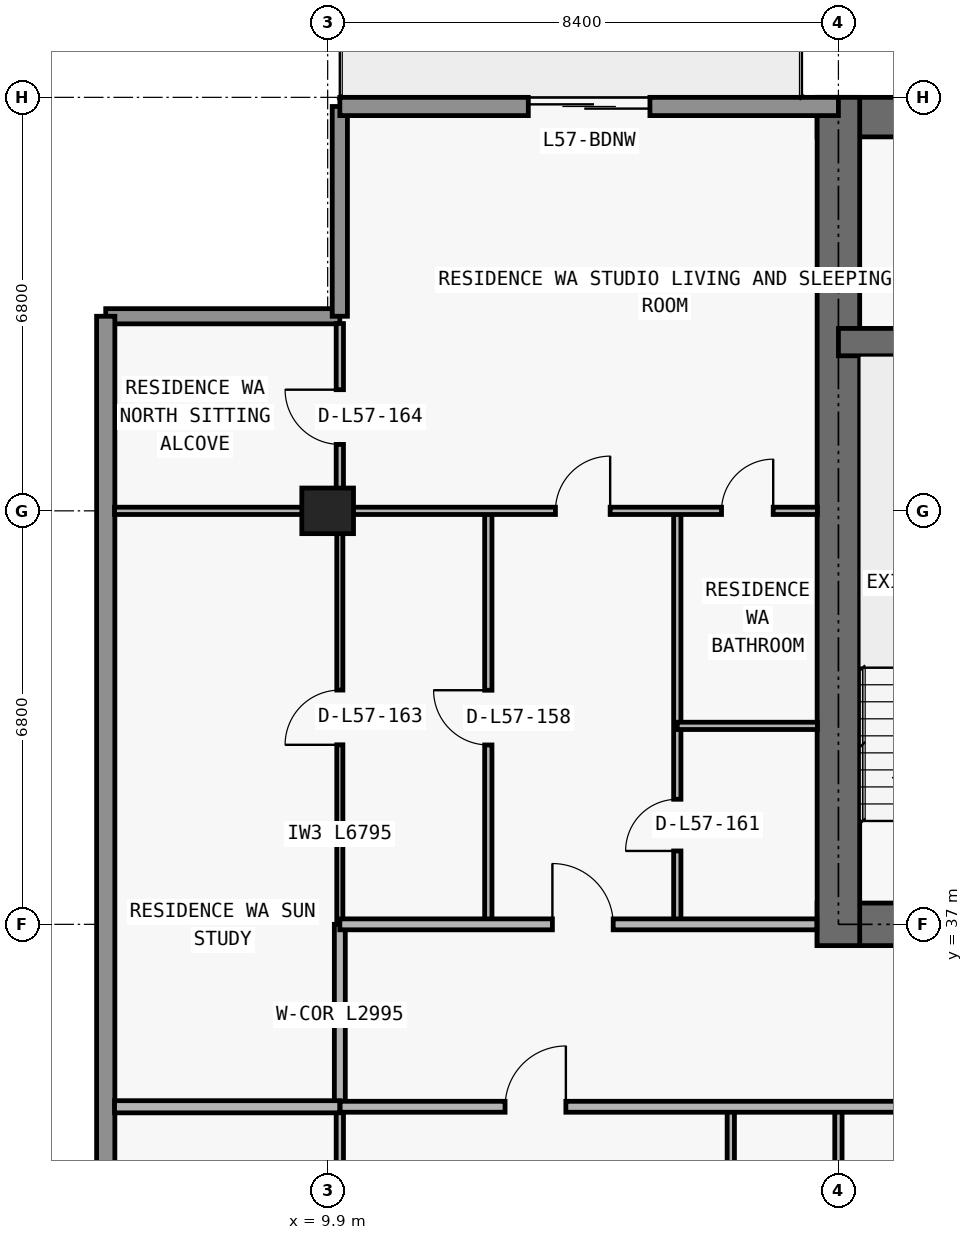
"""IFC4 building model, lengths in metres.
Left out: names, types, materials, properties, quantities, classifications, styles, units other than length and angle.
Written with IfcOpenShell. Run it as: python <this file> out.ifc"""

import sys

from ifc_helpers import new_model, si_unit, direction, frame, frame_2d, origin, origin_2d, place, context, subcontext, project, spatial, rectangle, extrude, element, fill, save


model = new_model("IFC4")
c1 = context("Model", 3, precision=1e-05, world=origin(), true_north=direction((0.0, 1.0)))
c2 = subcontext(c1, "Body", "Model", "MODEL_VIEW")
j1 = project(units=[si_unit("LENGTHUNIT", "METRE"), si_unit("PLANEANGLEUNIT", "RADIAN")], contexts=[c1])
p1 = place(None, origin())
s1 = spatial("IfcSite", under=j1, at=p1, CompositionType="ELEMENT")
p2 = place(p1, origin())
s2 = spatial("IfcBuilding", under=s1, at=p2, CompositionType="ELEMENT")
p3 = place(p2, frame((0.0, 0.0, 204.9)))
s3 = spatial("IfcBuildingStorey", under=s2, at=p3, CompositionType="ELEMENT", Elevation=204.9)
p4 = place(p3, frame((9.9, 43.8, 0.0), z_axis=(0.0, 0.0, 1.0), x_axis=(1.0, 0.0, 0.0)))
e1 = element("IfcColumn", 1, at=p4, inside=s3, PredefinedType="COLUMN", context=c2, shape_type="SweptSolid", body=[
    extrude(rectangle(XDim=0.85, YDim=0.75, at=origin_2d()), origin(), (0.0, 0.0, 1.0), 3.05),
])
p5 = place(p3, frame((17.95, 37.0, 0.0), z_axis=(0.0, 0.0, 1.0), x_axis=(1.0, 0.0, 0.0)))
e2 = element("IfcWall", 2, at=p5, inside=s3, PredefinedType="SHEAR", context=c2, shape_type="SweptSolid", body=[
    extrude(rectangle(XDim=41.9, YDim=0.7, at=frame_2d((20.95, 0.0))), origin(), (0.0, 0.0, 1.0), 3.05),
])
p6 = place(p5, frame((14.35, 0.0, 0.0)))
e3 = element("IfcOpeningElement", 3, at=p6, cuts=e2, PredefinedType="OPENING", context=c2, shape_type="SweptSolid", body=[
    extrude(rectangle(XDim=1.1, YDim=2.15, at=frame_2d((0.55, 1.075))), frame((0.0, 0.36, 0.0), z_axis=(0.0, -1.0, 0.0), x_axis=(1.0, 0.0, 0.0)), (0.0, 0.0, 1.0), 0.72),
])
p7 = place(p5, frame((6.2, 0.0, 0.0)))
e4 = element("IfcOpeningElement", 4, at=p7, cuts=e2, PredefinedType="OPENING", context=c2, shape_type="SweptSolid", body=[
    extrude(rectangle(XDim=1.05, YDim=2.15, at=frame_2d((0.525, 1.075))), frame((0.0, 0.36, 0.0), z_axis=(0.0, -1.0, 0.0), x_axis=(1.0, 0.0, 0.0)), (0.0, 0.0, 1.0), 0.72),
])
p8 = place(p5, frame((34.7, 0.0, 0.0)))
e5 = element("IfcOpeningElement", 5, at=p8, cuts=e2, PredefinedType="OPENING", context=c2, shape_type="SweptSolid", body=[
    extrude(rectangle(XDim=1.05, YDim=2.15, at=frame_2d((0.525, 1.075))), frame((0.0, 0.36, 0.0), z_axis=(0.0, -1.0, 0.0), x_axis=(1.0, 0.0, 0.0)), (0.0, 0.0, 1.0), 0.72),
])
p9 = place(p5, frame((10.812, 0.0, 0.0)))
e6 = element("IfcOpeningElement", 6, at=p9, cuts=e2, PredefinedType="OPENING", context=c2, shape_type="SweptSolid", body=[
    extrude(rectangle(XDim=1.05, YDim=2.15, at=frame_2d((0.525, 1.075))), frame((0.0, 0.36, 0.0), z_axis=(0.0, -1.0, 0.0), x_axis=(1.0, 0.0, 0.0)), (0.0, 0.0, 1.0), 0.72),
])
p10 = place(p5, frame((24.05, 0.0, 0.0)))
e7 = element("IfcOpeningElement", 7, at=p10, cuts=e2, PredefinedType="OPENING", context=c2, shape_type="SweptSolid", body=[
    extrude(rectangle(XDim=1.05, YDim=2.15, at=frame_2d((0.525, 1.075))), frame((0.0, 0.36, 0.0), z_axis=(0.0, -1.0, 0.0), x_axis=(1.0, 0.0, 0.0)), (0.0, 0.0, 1.0), 0.72),
])
p11 = place(p3, frame((17.95, 50.275, 0.0), z_axis=(0.0, 0.0, 1.0), x_axis=(1.0, 0.0, 0.0)))
e8 = element("IfcWall", 8, at=p11, inside=s3, PredefinedType="SHEAR", context=c2, shape_type="SweptSolid", body=[
    extrude(rectangle(XDim=41.9, YDim=0.65, at=frame_2d((20.95, 0.0))), origin(), (0.0, 0.0, 1.0), 3.05),
])
p12 = place(p3, frame((18.3, 36.65, 0.0), z_axis=(0.0, 0.0, 1.0), x_axis=(0.0, 1.0, 0.0)))
e9 = element("IfcWall", 9, at=p12, inside=s3, PredefinedType="SHEAR", context=c2, shape_type="SweptSolid", body=[
    extrude(rectangle(XDim=13.95, YDim=0.7, at=frame_2d((6.975, 0.0))), origin(), (0.0, 0.0, 1.0), 3.05),
])
p13 = place(p3, frame((18.3, 46.575, 0.0), z_axis=(0.0, 0.0, 1.0), x_axis=(1.0, 0.0, 0.0)))
e10 = element("IfcWall", 10, at=p13, inside=s3, PredefinedType="SHEAR", context=c2, shape_type="SweptSolid", body=[
    extrude(rectangle(XDim=41.2, YDim=0.45, at=frame_2d((20.6, 0.0))), origin(), (0.0, 0.0, 1.0), 3.05),
])
p14 = place(p13, frame((7.6, 0.0, 0.0)))
e11 = element("IfcOpeningElement", 11, at=p14, cuts=e10, PredefinedType="OPENING", context=c2, shape_type="SweptSolid", body=[
    extrude(rectangle(XDim=1.0, YDim=2.2, at=frame_2d((0.5, 1.1))), frame((0.0, 0.235, 0.0), z_axis=(0.0, -1.0, 0.0), x_axis=(1.0, 0.0, 0.0)), (0.0, 0.0, 1.0), 0.47),
])
p15 = place(p13, frame((32.625, 0.0, 0.0)))
e12 = element("IfcOpeningElement", 12, at=p15, cuts=e10, PredefinedType="OPENING", context=c2, shape_type="SweptSolid", body=[
    extrude(rectangle(XDim=1.05, YDim=2.15, at=frame_2d((0.525, 1.075))), frame((0.0, 0.235, 0.0), z_axis=(0.0, -1.0, 0.0), x_axis=(1.0, 0.0, 0.0)), (0.0, 0.0, 1.0), 0.47),
])
p16 = place(p3, frame((6.25, 47.0, 0.0), z_axis=(0.0, 0.0, 1.0), x_axis=(1.0, 0.0, 0.0)))
e13 = element("IfcWall", 13, at=p16, inside=s3, PredefinedType="ELEMENTEDWALL", context=c2, shape_type="SweptSolid", body=[
    extrude(rectangle(XDim=3.85, YDim=0.25, at=frame_2d((1.925, 0.0))), origin(), (0.0, 0.0, 1.0), 3.05),
])
p17 = place(p3, frame((10.1, 47.0, 0.0), z_axis=(0.0, 0.0, 1.0), x_axis=(0.0, 1.0, 0.0)))
e14 = element("IfcWall", 14, at=p17, inside=s3, PredefinedType="ELEMENTEDWALL", context=c2, shape_type="SweptSolid", body=[
    extrude(rectangle(XDim=3.45, YDim=0.25, at=frame_2d((1.725, 0.0))), origin(), (0.0, 0.0, 1.0), 3.05),
])
p18 = place(p3, frame((6.25, 29.1, 0.0), z_axis=(0.0, 0.0, 1.0), x_axis=(0.0, 1.0, 0.0)))
e15 = element("IfcWall", 15, at=p18, inside=s3, PredefinedType="STANDARD", context=c2, shape_type="SweptSolid", body=[
    extrude(rectangle(XDim=17.9, YDim=0.3, at=frame_2d((8.95, 0.0))), origin(), (0.0, 0.0, 1.0), 3.05),
])
p19 = place(p3, frame((10.1, 50.45, 0.0), z_axis=(0.0, 0.0, 1.0), x_axis=(1.0, 0.0, 0.0)))
e16 = element("IfcWall", 16, at=p19, inside=s3, PredefinedType="STANDARD", context=c2, shape_type="SweptSolid", body=[
    extrude(rectangle(XDim=8.2, YDim=0.3, at=frame_2d((4.1, 0.0))), origin(), (0.0, 0.0, 1.0), 3.05),
])
p20 = place(p19, frame((3.1, 0.0, 0.0)))
e17 = element("IfcOpeningElement", 17, at=p20, cuts=e16, PredefinedType="OPENING", context=c2, shape_type="SweptSolid", body=[
    extrude(rectangle(XDim=2.0, YDim=2.3, at=frame_2d((1.0, 1.15))), frame((0.0, 0.16, 0.0), z_axis=(0.0, -1.0, 0.0), x_axis=(1.0, 0.0, 0.0)), (0.0, 0.0, 1.0), 0.32),
])
p21 = place(p3, frame((10.1, 11.285, 0.0), z_axis=(0.0, 0.0, 1.0), x_axis=(0.0, 1.0, 0.0)))
e18 = element("IfcWall", 18, at=p21, inside=s3, PredefinedType="PARTITIONING", context=c2, shape_type="SweptSolid", body=[
    extrude(rectangle(XDim=22.715, YDim=0.12, at=frame_2d((11.357, 0.0))), origin(), (0.0, 0.0, 1.0), 2.263),
])
p22 = place(p21, frame((14.045, 0.0, 0.0)))
e19 = element("IfcOpeningElement", 19, at=p22, cuts=e18, PredefinedType="OPENING", context=c2, shape_type="SweptSolid", body=[
    extrude(rectangle(XDim=0.9, YDim=2.15, at=frame_2d((0.45, 1.075))), frame((0.0, 0.07, 0.0), z_axis=(0.0, -1.0, 0.0), x_axis=(1.0, 0.0, 0.0)), (0.0, 0.0, 1.0), 0.14),
])
p23 = place(p3, frame((10.1, 34.005, 0.0), z_axis=(0.0, 0.0, 1.0), x_axis=(0.0, 1.0, 0.0)))
e20 = element("IfcWall", 20, at=p23, inside=s3, PredefinedType="PARTITIONING", context=c2, shape_type="SweptSolid", body=[
    extrude(rectangle(XDim=2.995, YDim=0.18, at=frame_2d((1.498, 0.0))), origin(), (0.0, 0.0, 1.0), 2.263),
])
p24 = place(p3, frame((10.1, 37.005, 0.0), z_axis=(0.0, 0.0, 1.0), x_axis=(0.0, 1.0, 0.0)))
e21 = element("IfcWall", 21, at=p24, inside=s3, PredefinedType="MOVABLE", context=c2, shape_type="SweptSolid", body=[
    extrude(rectangle(XDim=6.795, YDim=0.1, at=frame_2d((3.397, 0.0))), origin(), (0.0, 0.0, 1.0), 2.263),
])
p25 = place(p24, frame((2.948, 0.0, 0.0)))
e22 = element("IfcOpeningElement", 22, at=p25, cuts=e21, PredefinedType="OPENING", context=c2, shape_type="SweptSolid", body=[
    extrude(rectangle(XDim=0.9, YDim=2.15, at=frame_2d((0.45, 1.075))), frame((0.0, 0.06, 0.0), z_axis=(0.0, -1.0, 0.0), x_axis=(1.0, 0.0, 0.0)), (0.0, 0.0, 1.0), 0.12),
])
p26 = place(p3, frame((10.1, 43.805, 0.0), z_axis=(0.0, 0.0, 1.0), x_axis=(0.0, 1.0, 0.0)))
e23 = element("IfcWall", 23, at=p26, inside=s3, PredefinedType="PARTITIONING", context=c2, shape_type="SweptSolid", body=[
    extrude(rectangle(XDim=3.075, YDim=0.12, at=frame_2d((1.538, 0.0))), origin(), (0.0, 0.0, 1.0), 3.05),
])
p27 = place(p26, frame((1.087, 0.0, 0.0)))
e24 = element("IfcOpeningElement", 24, at=p27, cuts=e23, PredefinedType="OPENING", context=c2, shape_type="SweptSolid", body=[
    extrude(rectangle(XDim=0.9, YDim=2.15, at=frame_2d((0.45, 1.075))), frame((0.0, 0.07, 0.0), z_axis=(0.0, -1.0, 0.0), x_axis=(1.0, 0.0, 0.0)), (0.0, 0.0, 1.0), 0.14),
])
p28 = place(p3, frame((12.542, 37.0, 0.0), z_axis=(0.0, 0.0, 1.0), x_axis=(0.0, 1.0, 0.0)))
e25 = element("IfcWall", 25, at=p28, inside=s3, PredefinedType="PARTITIONING", context=c2, shape_type="SweptSolid", body=[
    extrude(rectangle(XDim=6.8, YDim=0.12, at=frame_2d((3.4, 0.0))), origin(), (0.0, 0.0, 1.0), 3.05),
])
p29 = place(p28, frame((2.95, 0.0, 0.0)))
e26 = element("IfcOpeningElement", 26, at=p29, cuts=e25, PredefinedType="OPENING", context=c2, shape_type="SweptSolid", body=[
    extrude(rectangle(XDim=0.9, YDim=2.15, at=frame_2d((0.45, 1.075))), frame((0.0, 0.07, 0.0), z_axis=(0.0, -1.0, 0.0), x_axis=(1.0, 0.0, 0.0)), (0.0, 0.0, 1.0), 0.14),
])
p30 = place(p3, frame((15.65, 37.0, 0.0), z_axis=(0.0, 0.0, 1.0), x_axis=(0.0, 1.0, 0.0)))
e27 = element("IfcWall", 27, at=p30, inside=s3, PredefinedType="PARTITIONING", context=c2, shape_type="SweptSolid", body=[
    extrude(rectangle(XDim=6.8, YDim=0.12, at=frame_2d((3.4, 0.0))), origin(), (0.0, 0.0, 1.0), 3.05),
])
p31 = place(p30, frame((1.207, 0.0, 0.0)))
e28 = element("IfcOpeningElement", 28, at=p31, cuts=e27, PredefinedType="OPENING", context=c2, shape_type="SweptSolid", body=[
    extrude(rectangle(XDim=0.85, YDim=2.1, at=frame_2d((0.425, 1.05))), frame((0.0, 0.07, 0.0), z_axis=(0.0, -1.0, 0.0), x_axis=(1.0, 0.0, 0.0)), (0.0, 0.0, 1.0), 0.14),
])
p32 = place(p3, frame((16.53, 28.18, 0.0), z_axis=(0.0, 0.0, 1.0), x_axis=(0.0, 1.0, 0.0)))
e29 = element("IfcWall", 29, at=p32, inside=s3, PredefinedType="PARTITIONING", context=c2, shape_type="SweptSolid", body=[
    extrude(rectangle(XDim=5.82, YDim=0.12, at=frame_2d((2.91, 0.0))), origin(), (0.0, 0.0, 1.0), 3.05),
])
p33 = place(p32, frame((2.485, 0.0, 0.0)))
e30 = element("IfcOpeningElement", 30, at=p33, cuts=e29, PredefinedType="OPENING", context=c2, shape_type="SweptSolid", body=[
    extrude(rectangle(XDim=0.85, YDim=2.1, at=frame_2d((0.425, 1.05))), frame((0.0, 0.07, 0.0), z_axis=(0.0, -1.0, 0.0), x_axis=(1.0, 0.0, 0.0)), (0.0, 0.0, 1.0), 0.14),
])
p34 = place(p3, frame((18.3, 11.24, 0.0), z_axis=(0.0, 0.0, 1.0), x_axis=(0.0, 1.0, 0.0)))
e31 = element("IfcWall", 31, at=p34, inside=s3, PredefinedType="PARTITIONING", context=c2, shape_type="SweptSolid", body=[
    extrude(rectangle(XDim=22.76, YDim=0.12, at=frame_2d((11.38, 0.0))), origin(), (0.0, 0.0, 1.0), 2.263),
])
p35 = place(p34, frame((14.09, 0.0, 0.0)))
e32 = element("IfcOpeningElement", 32, at=p35, cuts=e31, PredefinedType="OPENING", context=c2, shape_type="SweptSolid", body=[
    extrude(rectangle(XDim=0.9, YDim=2.15, at=frame_2d((0.45, 1.075))), frame((0.0, 0.07, 0.0), z_axis=(0.0, -1.0, 0.0), x_axis=(1.0, 0.0, 0.0)), (0.0, 0.0, 1.0), 0.14),
])
p36 = place(p3, frame((6.395, 34.0, 0.0), z_axis=(0.0, 0.0, 1.0), x_axis=(1.0, 0.0, 0.0)))
e33 = element("IfcWall", 33, at=p36, inside=s3, PredefinedType="PARTITIONING", context=c2, shape_type="SweptSolid", body=[
    extrude(rectangle(XDim=3.705, YDim=0.2, at=frame_2d((1.853, 0.0))), origin(), (0.0, 0.0, 1.0), 3.05),
])
p37 = place(p3, frame((10.105, 34.0, 0.0), z_axis=(0.0, 0.0, 1.0), x_axis=(1.0, 0.0, 0.0)))
e34 = element("IfcWall", 34, at=p37, inside=s3, PredefinedType="PARTITIONING", context=c2, shape_type="SweptSolid", body=[
    extrude(rectangle(XDim=57.595, YDim=0.18, at=frame_2d((28.797, 0.0))), origin(), (0.0, 0.0, 1.0), 3.05),
])
p38 = place(p37, frame((2.712, 0.0, 0.0)))
e35 = element("IfcOpeningElement", 35, at=p38, cuts=e34, PredefinedType="OPENING", context=c2, shape_type="SweptSolid", body=[
    extrude(rectangle(XDim=1.0, YDim=2.2, at=frame_2d((0.5, 1.1))), frame((0.0, 0.1, 0.0), z_axis=(0.0, -1.0, 0.0), x_axis=(1.0, 0.0, 0.0)), (0.0, 0.0, 1.0), 0.2),
])
p39 = place(p37, frame((19.391, 0.0, 0.0)))
e36 = element("IfcOpeningElement", 36, at=p39, cuts=e34, PredefinedType="OPENING", context=c2, shape_type="SweptSolid", body=[
    extrude(rectangle(XDim=1.0, YDim=2.2, at=frame_2d((0.5, 1.1))), frame((0.0, 0.1, 0.0), z_axis=(0.0, -1.0, 0.0), x_axis=(1.0, 0.0, 0.0)), (0.0, 0.0, 1.0), 0.2),
])
p40 = place(p37, frame((43.794, 0.0, 0.0)))
e37 = element("IfcOpeningElement", 37, at=p40, cuts=e34, PredefinedType="OPENING", context=c2, shape_type="SweptSolid", body=[
    extrude(rectangle(XDim=1.0, YDim=2.2, at=frame_2d((0.5, 1.1))), frame((0.0, 0.1, 0.0), z_axis=(0.0, -1.0, 0.0), x_axis=(1.0, 0.0, 0.0)), (0.0, 0.0, 1.0), 0.2),
])
p41 = place(p3, frame((10.1, 37.0, 0.0), z_axis=(0.0, 0.0, 1.0), x_axis=(1.0, 0.0, 0.0)))
e38 = element("IfcWall", 38, at=p41, inside=s3, PredefinedType="PARTITIONING", context=c2, shape_type="SweptSolid", body=[
    extrude(rectangle(XDim=7.845, YDim=0.18, at=frame_2d((3.922, 0.0))), origin(), (0.0, 0.0, 1.0), 3.05),
])
p42 = place(p41, frame((3.496, 0.0, 0.0)))
e39 = element("IfcOpeningElement", 39, at=p42, cuts=e38, PredefinedType="OPENING", context=c2, shape_type="SweptSolid", body=[
    extrude(rectangle(XDim=1.0, YDim=2.2, at=frame_2d((0.5, 1.1))), frame((0.0, 0.1, 0.0), z_axis=(0.0, -1.0, 0.0), x_axis=(1.0, 0.0, 0.0)), (0.0, 0.0, 1.0), 0.2),
])
p43 = place(p3, frame((15.65, 40.264, 0.0), z_axis=(0.0, 0.0, 1.0), x_axis=(1.0, 0.0, 0.0)))
e40 = element("IfcWall", 40, at=p43, inside=s3, PredefinedType="PARTITIONING", context=c2, shape_type="SweptSolid", body=[
    extrude(rectangle(XDim=2.305, YDim=0.12, at=frame_2d((1.153, 0.0))), origin(), (0.0, 0.0, 1.0), 3.05),
])
p44 = place(p3, frame((6.395, 43.8, 0.0), z_axis=(0.0, 0.0, 1.0), x_axis=(1.0, 0.0, 0.0)))
e41 = element("IfcWall", 41, at=p44, inside=s3, PredefinedType="PARTITIONING", context=c2, shape_type="SweptSolid", body=[
    extrude(rectangle(XDim=11.56, YDim=0.12, at=frame_2d((5.78, 0.0))), origin(), (0.0, 0.0, 1.0), 2.418),
])
p45 = place(p44, frame((7.251, 0.0, 0.0)))
e42 = element("IfcOpeningElement", 42, at=p45, cuts=e41, PredefinedType="OPENING", context=c2, shape_type="SweptSolid", body=[
    extrude(rectangle(XDim=0.9, YDim=2.15, at=frame_2d((0.45, 1.075))), frame((0.0, 0.07, 0.0), z_axis=(0.0, -1.0, 0.0), x_axis=(1.0, 0.0, 0.0)), (0.0, 0.0, 1.0), 0.14),
])
p46 = place(p44, frame((9.982, 0.0, 0.0)))
e43 = element("IfcOpeningElement", 43, at=p46, cuts=e41, PredefinedType="OPENING", context=c2, shape_type="SweptSolid", body=[
    extrude(rectangle(XDim=0.85, YDim=2.1, at=frame_2d((0.425, 1.05))), frame((0.0, 0.07, 0.0), z_axis=(0.0, -1.0, 0.0), x_axis=(1.0, 0.0, 0.0)), (0.0, 0.0, 1.0), 0.14),
])
p47 = place(p20, origin())
e44 = element("IfcDoor", 44, at=p47, inside=s3, OperationType="DOUBLE_DOOR_SLIDING", PredefinedType="DOOR", context=c2, shape_type="SweptSolid", body=[
    extrude(rectangle(XDim=2.0, YDim=2.3, at=frame_2d((1.0, 1.15))), frame((0.0, 0.025, 0.0), z_axis=(0.0, -1.0, 0.0), x_axis=(1.0, 0.0, 0.0)), (0.0, 0.0, 1.0), 0.05),
])
fill(e17, e44)
p48 = place(p38, origin())
e45 = element("IfcDoor", 45, at=p48, inside=s3, OperationType="SINGLE_SWING_RIGHT", PredefinedType="DOOR", context=c2, shape_type="SweptSolid", body=[
    extrude(rectangle(XDim=1.0, YDim=2.2, at=frame_2d((0.5, 1.1))), frame((0.0, 0.025, 0.0), z_axis=(0.0, -1.0, 0.0), x_axis=(1.0, 0.0, 0.0)), (0.0, 0.0, 1.0), 0.05),
])
fill(e35, e45)
p49 = place(p29, origin())
e46 = element("IfcDoor", 46, at=p49, inside=s3, OperationType="SINGLE_SWING_RIGHT", PredefinedType="DOOR", context=c2, shape_type="SweptSolid", body=[
    extrude(rectangle(XDim=0.9, YDim=2.15, at=frame_2d((0.45, 1.075))), frame((0.0, 0.025, 0.0), z_axis=(0.0, -1.0, 0.0), x_axis=(1.0, 0.0, 0.0)), (0.0, 0.0, 1.0), 0.05),
])
fill(e26, e46)
p50 = place(p42, origin())
e47 = element("IfcDoor", 47, at=p50, inside=s3, OperationType="SINGLE_SWING_LEFT", PredefinedType="DOOR", context=c2, shape_type="SweptSolid", body=[
    extrude(rectangle(XDim=1.0, YDim=2.2, at=frame_2d((0.5, 1.1))), frame((0.0, 0.025, 0.0), z_axis=(0.0, -1.0, 0.0), x_axis=(1.0, 0.0, 0.0)), (0.0, 0.0, 1.0), 0.05),
])
fill(e39, e47)
p51 = place(p45, origin())
e48 = element("IfcDoor", 48, at=p51, inside=s3, OperationType="SINGLE_SWING_RIGHT", PredefinedType="DOOR", context=c2, shape_type="SweptSolid", body=[
    extrude(rectangle(XDim=0.9, YDim=2.15, at=frame_2d((0.45, 1.075))), frame((0.0, 0.025, 0.0), z_axis=(0.0, -1.0, 0.0), x_axis=(1.0, 0.0, 0.0)), (0.0, 0.0, 1.0), 0.05),
])
fill(e42, e48)
p52 = place(p31, origin())
e49 = element("IfcDoor", 49, at=p52, inside=s3, OperationType="SINGLE_SWING_LEFT", PredefinedType="DOOR", context=c2, shape_type="SweptSolid", body=[
    extrude(rectangle(XDim=0.85, YDim=2.1, at=frame_2d((0.425, 1.05))), frame((0.0, 0.025, 0.0), z_axis=(0.0, -1.0, 0.0), x_axis=(1.0, 0.0, 0.0)), (0.0, 0.0, 1.0), 0.05),
])
fill(e28, e49)
p53 = place(p46, origin())
e50 = element("IfcDoor", 50, at=p53, inside=s3, OperationType="SINGLE_SWING_RIGHT", PredefinedType="DOOR", context=c2, shape_type="SweptSolid", body=[
    extrude(rectangle(XDim=0.85, YDim=2.1, at=frame_2d((0.425, 1.05))), frame((0.0, 0.025, 0.0), z_axis=(0.0, -1.0, 0.0), x_axis=(1.0, 0.0, 0.0)), (0.0, 0.0, 1.0), 0.05),
])
fill(e43, e50)
p54 = place(p25, origin())
e51 = element("IfcDoor", 51, at=p54, inside=s3, OperationType="SINGLE_SWING_LEFT", PredefinedType="DOOR", context=c2, shape_type="SweptSolid", body=[
    extrude(rectangle(XDim=0.9, YDim=2.15, at=frame_2d((0.45, 1.075))), frame((0.0, 0.025, 0.0), z_axis=(0.0, -1.0, 0.0), x_axis=(1.0, 0.0, 0.0)), (0.0, 0.0, 1.0), 0.05),
])
fill(e22, e51)
p55 = place(p27, origin())
e52 = element("IfcDoor", 52, at=p55, inside=s3, OperationType="SINGLE_SWING_RIGHT", PredefinedType="DOOR", context=c2, shape_type="SweptSolid", body=[
    extrude(rectangle(XDim=0.9, YDim=2.15, at=frame_2d((0.45, 1.075))), frame((0.0, 0.025, 0.0), z_axis=(0.0, -1.0, 0.0), x_axis=(1.0, 0.0, 0.0)), (0.0, 0.0, 1.0), 0.05),
])
fill(e24, e52)
save(model, sys.argv[1])
